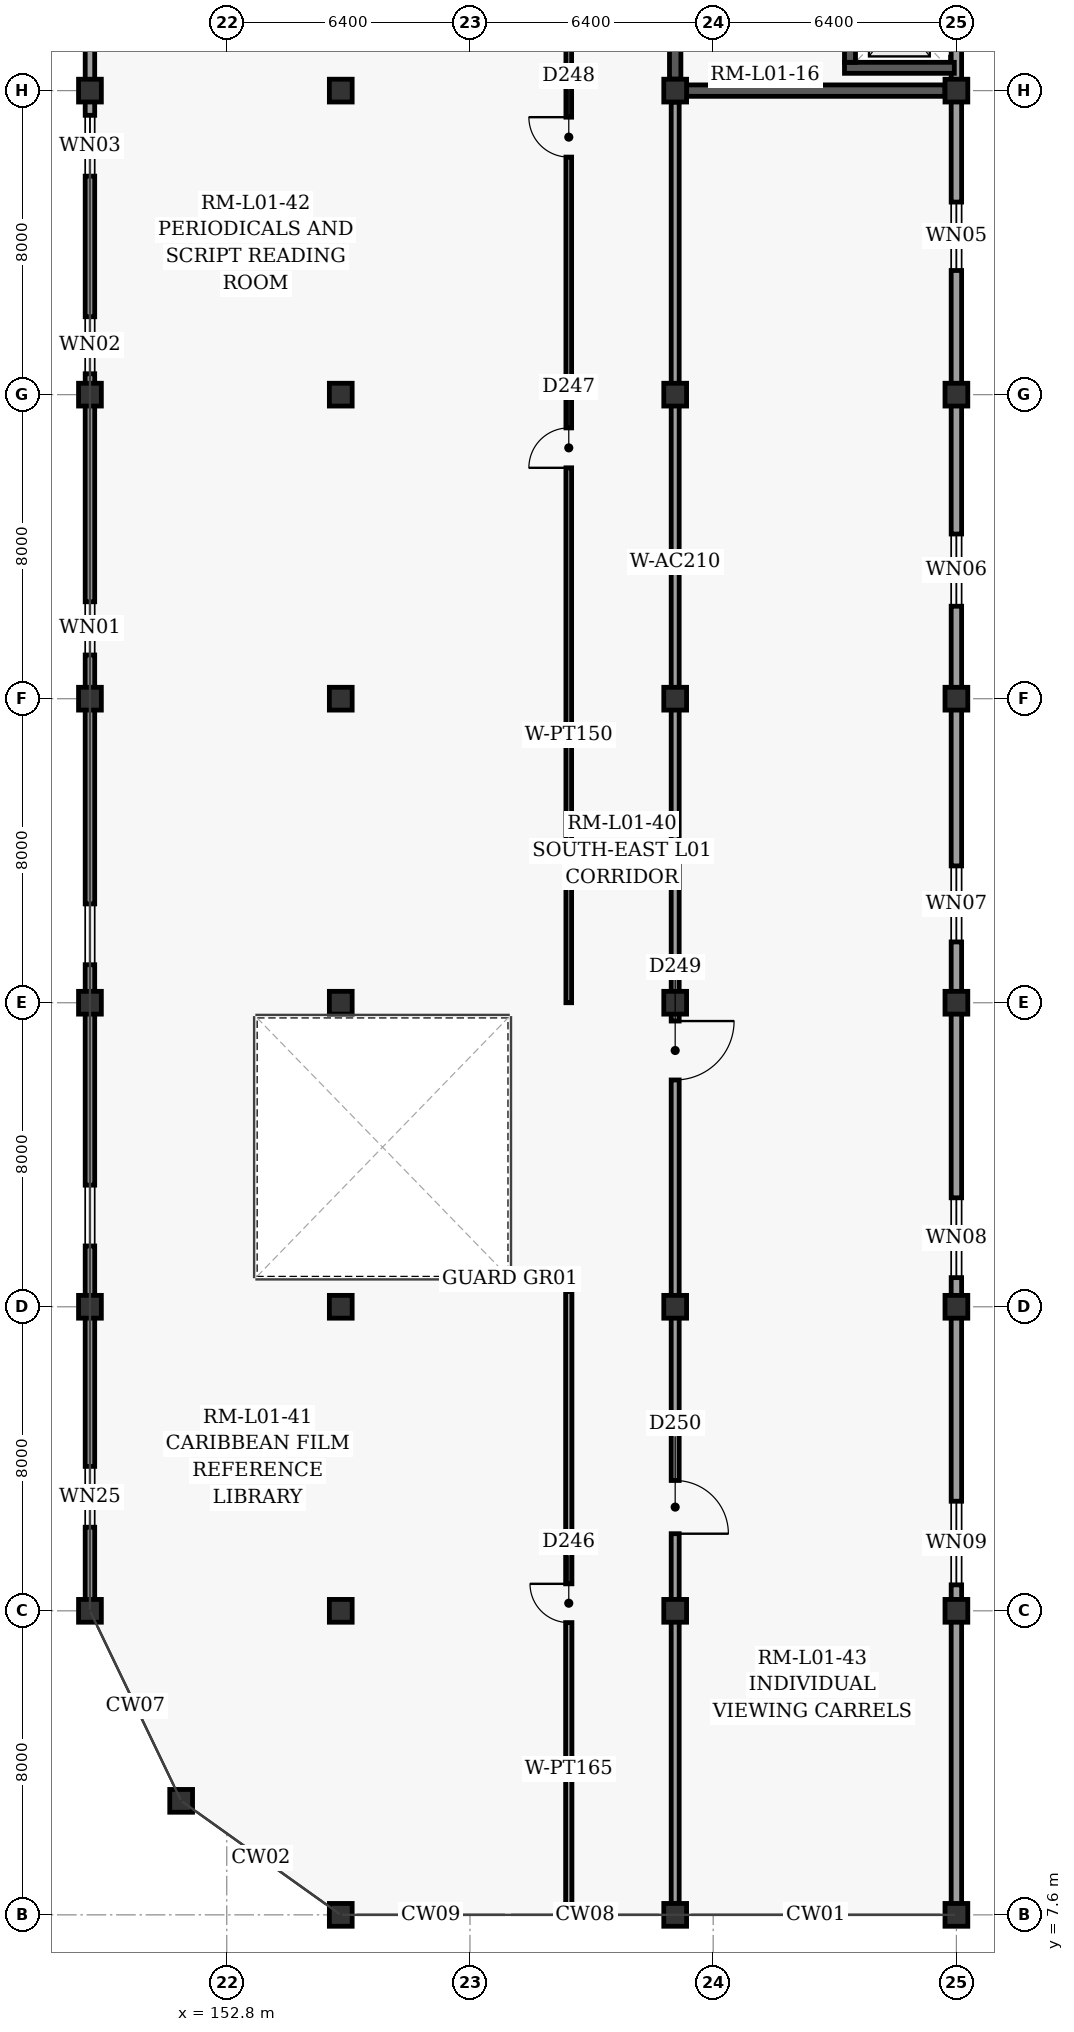
"""IFC4 building model, lengths in metres.
Left out: names, types, materials, properties, quantities, classifications, styles, units other than length and angle.
Written with IfcOpenShell. Run it as: python <this file> out.ifc"""

import sys

from ifc_helpers import new_model, si_unit, direction, frame, frame_2d, origin, origin_2d, place, context, subcontext, project, spatial, rectangle, extrude, element, fill, save


model = new_model("IFC4")
c1 = context("Model", 3, precision=1e-05, world=origin(), true_north=direction((0.0, 1.0)))
c2 = subcontext(c1, "Body", "Model", "MODEL_VIEW")
j1 = project(units=[si_unit("LENGTHUNIT", "METRE"), si_unit("PLANEANGLEUNIT", "RADIAN")], contexts=[c1])
p1 = place(None, origin())
s1 = spatial("IfcSite", under=j1, at=p1, CompositionType="ELEMENT")
p2 = place(p1, origin())
s2 = spatial("IfcBuilding", under=s1, at=p2, CompositionType="ELEMENT")
p3 = place(p2, frame((0.0, 0.0, 5.4)))
s3 = spatial("IfcBuildingStorey", under=s2, at=p3, CompositionType="ELEMENT", Elevation=5.4)
for number, where, z_axis, x_axis in (
    (1, (149.2, 15.6, 0.0), (0.0, 0.0, 1.0), (1.0, 0.0, 0.0)),
    (2, (149.2, 23.6, 0.0), (0.0, 0.0, 1.0), (1.0, 0.0, 0.0)),
    (3, (149.2, 31.6, 0.0), (0.0, 0.0, 1.0), (1.0, 0.0, 0.0)),
    (4, (149.2, 39.6, 0.0), (0.0, 0.0, 1.0), (1.0, 0.0, 0.0)),
    (5, (149.2, 47.6, 0.0), (0.0, 0.0, 1.0), (1.0, 0.0, 0.0)),
    (6, (149.2, 55.6, 0.0), (0.0, 0.0, 1.0), (1.0, 0.0, 0.0)),
    (7, (151.6, 10.6, 0.0), (0.0, 0.0, 1.0), (1.0, 0.0, 0.0)),
    (8, (155.8, 7.6, 0.0), (0.0, 0.0, 1.0), (1.0, 0.0, 0.0)),
    (9, (155.8, 15.6, 0.0), (0.0, 0.0, 1.0), (1.0, 0.0, 0.0)),
    (10, (155.8, 23.6, 0.0), (0.0, 0.0, 1.0), (1.0, 0.0, 0.0)),
    (11, (155.8, 31.6, 0.0), (0.0, 0.0, 1.0), (1.0, 0.0, 0.0)),
    (12, (155.8, 39.6, 0.0), (0.0, 0.0, 1.0), (1.0, 0.0, 0.0)),
    (13, (155.8, 47.6, 0.0), (0.0, 0.0, 1.0), (1.0, 0.0, 0.0)),
    (14, (155.8, 55.6, 0.0), (0.0, 0.0, 1.0), (1.0, 0.0, 0.0)),
    (15, (164.6, 7.6, 0.0), (0.0, 0.0, 1.0), (1.0, 0.0, 0.0)),
    (16, (164.6, 15.6, 0.0), (0.0, 0.0, 1.0), (1.0, 0.0, 0.0)),
    (17, (164.6, 23.6, 0.0), (0.0, 0.0, 1.0), (1.0, 0.0, 0.0)),
    (18, (164.6, 31.6, 0.0), (0.0, 0.0, 1.0), (1.0, 0.0, 0.0)),
    (19, (164.6, 39.6, 0.0), (0.0, 0.0, 1.0), (1.0, 0.0, 0.0)),
    (20, (164.6, 47.6, 0.0), (0.0, 0.0, 1.0), (1.0, 0.0, 0.0)),
    (21, (164.6, 55.6, 0.0), (0.0, 0.0, 1.0), (1.0, 0.0, 0.0)),
    (22, (172.0, 7.6, 0.0), (0.0, 0.0, 1.0), (1.0, 0.0, 0.0)),
    (23, (172.0, 15.6, 0.0), (0.0, 0.0, 1.0), (1.0, 0.0, 0.0)),
    (24, (172.0, 23.6, 0.0), (0.0, 0.0, 1.0), (1.0, 0.0, 0.0)),
    (25, (172.0, 31.6, 0.0), (0.0, 0.0, 1.0), (1.0, 0.0, 0.0)),
    (26, (172.0, 39.6, 0.0), (0.0, 0.0, 1.0), (1.0, 0.0, 0.0)),
    (27, (172.0, 47.6, 0.0), (0.0, 0.0, 1.0), (1.0, 0.0, 0.0)),
    (28, (172.0, 55.6, 0.0), (0.0, 0.0, 1.0), (1.0, 0.0, 0.0)),
):
    element("IfcColumn", number, at=place(p3, frame(where, z_axis=z_axis, x_axis=x_axis)), inside=s3, PredefinedType="COLUMN", context=c2, shape_type="SweptSolid", body=[
        extrude(rectangle(XDim=0.6, YDim=0.6, at=origin_2d()), origin(), (0.0, 0.0, 1.0), 4.8),
    ])
p4 = place(p3, frame((149.2, 15.6, 0.0), z_axis=(0.0, 0.0, 1.0), x_axis=(0.0, 1.0, 0.0)))
e29 = element("IfcWall", 29, at=p4, inside=s3, PredefinedType="SOLIDWALL", context=c2, shape_type="SweptSolid", body=[
    extrude(rectangle(XDim=48.0, YDim=0.25, at=frame_2d((24.0, 0.0))), origin(), (0.0, 0.0, 1.0), 3.67),
])
p5 = place(p4, frame((2.2, 0.0, 0.8)))
e30 = element("IfcOpeningElement", 30, at=p5, cuts=e29, PredefinedType="OPENING", context=c2, shape_type="SweptSolid", body=[
    extrude(rectangle(XDim=1.6, YDim=1.65, at=frame_2d((0.8, 0.825))), frame((0.0, 0.135, 0.0), z_axis=(0.0, -1.0, 0.0), x_axis=(1.0, 0.0, 0.0)), (0.0, 0.0, 1.0), 0.27),
])
p6 = place(p4, frame((9.6, 0.0, 0.8)))
e31 = element("IfcOpeningElement", 31, at=p6, cuts=e29, PredefinedType="OPENING", context=c2, shape_type="SweptSolid", body=[
    extrude(rectangle(XDim=1.6, YDim=1.65, at=frame_2d((0.8, 0.825))), frame((0.0, 0.135, 0.0), z_axis=(0.0, -1.0, 0.0), x_axis=(1.0, 0.0, 0.0)), (0.0, 0.0, 1.0), 0.27),
])
p7 = place(p4, frame((17.0, 0.0, 0.8)))
e32 = element("IfcOpeningElement", 32, at=p7, cuts=e29, PredefinedType="OPENING", context=c2, shape_type="SweptSolid", body=[
    extrude(rectangle(XDim=1.6, YDim=1.65, at=frame_2d((0.8, 0.825))), frame((0.0, 0.135, 0.0), z_axis=(0.0, -1.0, 0.0), x_axis=(1.0, 0.0, 0.0)), (0.0, 0.0, 1.0), 0.27),
])
p8 = place(p4, frame((25.15, 0.0, 0.8)))
e33 = element("IfcOpeningElement", 33, at=p8, cuts=e29, PredefinedType="OPENING", context=c2, shape_type="SweptSolid", body=[
    extrude(rectangle(XDim=1.4, YDim=2.1, at=frame_2d((0.7, 1.05))), frame((0.0, 0.135, 0.0), z_axis=(0.0, -1.0, 0.0), x_axis=(1.0, 0.0, 0.0)), (0.0, 0.0, 1.0), 0.27),
])
p9 = place(p4, frame((32.55, 0.0, 0.8)))
e34 = element("IfcOpeningElement", 34, at=p9, cuts=e29, PredefinedType="OPENING", context=c2, shape_type="SweptSolid", body=[
    extrude(rectangle(XDim=1.5, YDim=2.1, at=frame_2d((0.75, 1.05))), frame((0.0, 0.135, 0.0), z_axis=(0.0, -1.0, 0.0), x_axis=(1.0, 0.0, 0.0)), (0.0, 0.0, 1.0), 0.27),
])
p10 = place(p4, frame((37.75, 0.0, 0.8)))
e35 = element("IfcOpeningElement", 35, at=p10, cuts=e29, PredefinedType="OPENING", context=c2, shape_type="SweptSolid", body=[
    extrude(rectangle(XDim=1.6, YDim=2.1, at=frame_2d((0.8, 1.05))), frame((0.0, 0.135, 0.0), z_axis=(0.0, -1.0, 0.0), x_axis=(1.0, 0.0, 0.0)), (0.0, 0.0, 1.0), 0.27),
])
p11 = place(p3, frame((172.0, 63.6, 0.0), z_axis=(0.0, 0.0, 1.0), x_axis=(0.0, -1.0, 0.0)))
e36 = element("IfcWall", 36, at=p11, inside=s3, PredefinedType="SOLIDWALL", context=c2, shape_type="SweptSolid", body=[
    extrude(rectangle(XDim=56.0, YDim=0.275, at=frame_2d((28.0, 0.0))), origin(), (0.0, 0.0, 1.0), 3.67),
])
p12 = place(p11, frame((10.933, 0.0, 0.8)))
e37 = element("IfcOpeningElement", 37, at=p12, cuts=e36, PredefinedType="OPENING", context=c2, shape_type="SweptSolid", body=[
    extrude(rectangle(XDim=1.8, YDim=2.15, at=frame_2d((0.9, 1.075))), frame((0.0, 0.147, 0.0), z_axis=(0.0, -1.0, 0.0), x_axis=(1.0, 0.0, 0.0)), (0.0, 0.0, 1.0), 0.295),
])
p13 = place(p11, frame((19.667, 0.0, 0.8)))
e38 = element("IfcOpeningElement", 38, at=p13, cuts=e36, PredefinedType="OPENING", context=c2, shape_type="SweptSolid", body=[
    extrude(rectangle(XDim=1.9, YDim=2.2, at=frame_2d((0.95, 1.1))), frame((0.0, 0.147, 0.0), z_axis=(0.0, -1.0, 0.0), x_axis=(1.0, 0.0, 0.0)), (0.0, 0.0, 1.0), 0.295),
])
p14 = place(p11, frame((28.4, 0.0, 0.8)))
e39 = element("IfcOpeningElement", 39, at=p14, cuts=e36, PredefinedType="OPENING", context=c2, shape_type="SweptSolid", body=[
    extrude(rectangle(XDim=2.0, YDim=2.2, at=frame_2d((1.0, 1.1))), frame((0.0, 0.147, 0.0), z_axis=(0.0, -1.0, 0.0), x_axis=(1.0, 0.0, 0.0)), (0.0, 0.0, 1.0), 0.295),
])
p15 = place(p11, frame((37.133, 0.0, 0.8)))
e40 = element("IfcOpeningElement", 40, at=p15, cuts=e36, PredefinedType="OPENING", context=c2, shape_type="SweptSolid", body=[
    extrude(rectangle(XDim=2.1, YDim=2.2, at=frame_2d((1.05, 1.1))), frame((0.0, 0.147, 0.0), z_axis=(0.0, -1.0, 0.0), x_axis=(1.0, 0.0, 0.0)), (0.0, 0.0, 1.0), 0.295),
])
p16 = place(p11, frame((45.117, 0.0, 0.8)))
e41 = element("IfcOpeningElement", 41, at=p16, cuts=e36, PredefinedType="OPENING", context=c2, shape_type="SweptSolid", body=[
    extrude(rectangle(XDim=2.2, YDim=2.25, at=frame_2d((1.1, 1.125))), frame((0.0, 0.147, 0.0), z_axis=(0.0, -1.0, 0.0), x_axis=(1.0, 0.0, 0.0)), (0.0, 0.0, 1.0), 0.295),
])
p17 = place(p3, frame((164.902, 55.6, 0.0), z_axis=(0.0, 0.0, 1.0), x_axis=(1.0, 0.0, 0.0)))
e42 = element("IfcWall", 42, at=p17, inside=s3, PredefinedType="SHEAR", context=c2, shape_type="SweptSolid", body=[
    extrude(rectangle(XDim=6.796, YDim=0.3, at=frame_2d((3.398, 0.0))), origin(), (0.0, 0.0, 1.0), 4.52),
])
p18 = place(p3, frame((164.6, 55.902, 0.0), z_axis=(0.0, 0.0, 1.0), x_axis=(0.0, 1.0, 0.0)))
e43 = element("IfcWall", 43, at=p18, inside=s3, PredefinedType="SHEAR", context=c2, shape_type="SweptSolid", body=[
    extrude(rectangle(XDim=7.396, YDim=0.3, at=frame_2d((3.698, 0.0))), origin(), (0.0, 0.0, 1.0), 4.52),
])
p19 = place(p18, frame((5.348, 0.0, 0.0)))
e44 = element("IfcOpeningElement", 44, at=p19, cuts=e43, PredefinedType="OPENING", context=c2, shape_type="SweptSolid", body=[
    extrude(rectangle(XDim=1.1, YDim=2.15, at=frame_2d((0.55, 1.075))), frame((0.0, 0.16, 0.0), z_axis=(0.0, -1.0, 0.0), x_axis=(1.0, 0.0, 0.0)), (0.0, 0.0, 1.0), 0.32),
])
p20 = place(p18, frame((1.323, 0.0, 0.0)))
e45 = element("IfcOpeningElement", 45, at=p20, cuts=e43, PredefinedType="OPENING", context=c2, shape_type="SweptSolid", body=[
    extrude(rectangle(XDim=1.15, YDim=2.2, at=frame_2d((0.575, 1.1))), frame((0.0, 0.16, 0.0), z_axis=(0.0, -1.0, 0.0), x_axis=(1.0, 0.0, 0.0)), (0.0, 0.0, 1.0), 0.32),
])
p21 = place(p3, frame((169.055, 56.2, 0.0), z_axis=(0.0, 0.0, 1.0), x_axis=(1.0, 0.0, 0.0)))
e46 = element("IfcWall", 46, at=p21, inside=s3, PredefinedType="SHEAR", context=c2, shape_type="SweptSolid", body=[
    extrude(rectangle(XDim=2.89, YDim=0.29, at=frame_2d((1.445, 0.0))), origin(), (0.0, 0.0, 1.0), 4.52),
])
p22 = place(p3, frame((169.2, 56.345, 0.0), z_axis=(0.0, 0.0, 1.0), x_axis=(0.0, 1.0, 0.0)))
e47 = element("IfcWall", 47, at=p22, inside=s3, PredefinedType="SHEAR", context=c2, shape_type="SweptSolid", body=[
    extrude(rectangle(XDim=2.41, YDim=0.29, at=frame_2d((1.205, 0.0))), origin(), (0.0, 0.0, 1.0), 4.52),
])
p23 = place(p22, frame((0.705, 0.0, 0.0)))
e48 = element("IfcOpeningElement", 48, at=p23, cuts=e47, PredefinedType="OPENING", context=c2, shape_type="SweptSolid", body=[
    extrude(rectangle(XDim=1.0, YDim=2.15, at=frame_2d((0.5, 1.075))), frame((0.0, 0.155, 0.0), z_axis=(0.0, -1.0, 0.0), x_axis=(1.0, 0.0, 0.0)), (0.0, 0.0, 1.0), 0.31),
])
p24 = place(p3, frame((161.8, 7.6, 0.0), z_axis=(0.0, 0.0, 1.0), x_axis=(0.0, 1.0, 0.0)))
e49 = element("IfcWall", 49, at=p24, inside=s3, PredefinedType="PARTITIONING", context=c2, shape_type="SweptSolid", body=[
    extrude(rectangle(XDim=16.4, YDim=0.165, at=frame_2d((8.2, 0.0))), origin(), (0.0, 0.0, 1.0), 4.52),
])
p25 = place(p24, frame((7.69, 0.0, 0.0)))
e50 = element("IfcOpeningElement", 50, at=p25, cuts=e49, PredefinedType="OPENING", context=c2, shape_type="SweptSolid", body=[
    extrude(rectangle(XDim=1.02, YDim=2.1, at=frame_2d((0.51, 1.05))), frame((0.0, 0.093, 0.0), z_axis=(0.0, -1.0, 0.0), x_axis=(1.0, 0.0, 0.0)), (0.0, 0.0, 1.0), 0.185),
])
p26 = place(p3, frame((161.8, 31.6, 0.0), z_axis=(0.0, 0.0, 1.0), x_axis=(0.0, 1.0, 0.0)))
e51 = element("IfcWall", 51, at=p26, inside=s3, PredefinedType="PARTITIONING", context=c2, shape_type="SweptSolid", body=[
    extrude(rectangle(XDim=29.2, YDim=0.15, at=frame_2d((14.6, 0.0))), origin(), (0.0, 0.0, 1.0), 4.52),
])
p27 = place(p26, frame((14.075, 0.0, 0.0)))
e52 = element("IfcOpeningElement", 52, at=p27, cuts=e51, PredefinedType="OPENING", context=c2, shape_type="SweptSolid", body=[
    extrude(rectangle(XDim=1.05, YDim=2.15, at=frame_2d((0.525, 1.075))), frame((0.0, 0.085, 0.0), z_axis=(0.0, -1.0, 0.0), x_axis=(1.0, 0.0, 0.0)), (0.0, 0.0, 1.0), 0.17),
])
p28 = place(p26, frame((22.251, 0.0, 0.0)))
e53 = element("IfcOpeningElement", 53, at=p28, cuts=e51, PredefinedType="OPENING", context=c2, shape_type="SweptSolid", body=[
    extrude(rectangle(XDim=1.05, YDim=2.15, at=frame_2d((0.525, 1.075))), frame((0.0, 0.085, 0.0), z_axis=(0.0, -1.0, 0.0), x_axis=(1.0, 0.0, 0.0)), (0.0, 0.0, 1.0), 0.17),
])
p29 = place(p3, frame((164.6, 55.298, 0.0), z_axis=(0.0, 0.0, 1.0), x_axis=(0.0, -1.0, 0.0)))
e54 = element("IfcWall", 54, at=p29, inside=s3, PredefinedType="PARTITIONING", context=c2, shape_type="SweptSolid", body=[
    extrude(rectangle(XDim=47.396, YDim=0.21, at=frame_2d((23.698, 0.0))), origin(), (0.0, 0.0, 1.0), 3.67),
])
p30 = place(p29, frame((24.18, 0.0, 0.0)))
e55 = element("IfcOpeningElement", 55, at=p30, cuts=e54, PredefinedType="OPENING", context=c2, shape_type="SweptSolid", body=[
    extrude(rectangle(XDim=1.55, YDim=2.25, at=frame_2d((0.775, 1.125))), frame((0.0, 0.115, 0.0), z_axis=(0.0, -1.0, 0.0), x_axis=(1.0, 0.0, 0.0)), (0.0, 0.0, 1.0), 0.23),
])
p31 = place(p29, frame((36.269, 0.0, 0.0)))
e56 = element("IfcOpeningElement", 56, at=p31, cuts=e54, PredefinedType="OPENING", context=c2, shape_type="SweptSolid", body=[
    extrude(rectangle(XDim=1.4, YDim=2.25, at=frame_2d((0.7, 1.125))), frame((0.0, 0.115, 0.0), z_axis=(0.0, -1.0, 0.0), x_axis=(1.0, 0.0, 0.0)), (0.0, 0.0, 1.0), 0.23),
])
p32 = place(p5, origin())
e57 = element("IfcWindow", 57, at=p32, inside=s3, PartitioningType="SINGLE_PANEL", PredefinedType="WINDOW", context=c2, shape_type="SweptSolid", body=[
    extrude(rectangle(XDim=1.6, YDim=1.65, at=frame_2d((0.8, 0.825))), frame((0.0, 0.03, 0.0), z_axis=(0.0, -1.0, 0.0), x_axis=(1.0, 0.0, 0.0)), (0.0, 0.0, 1.0), 0.06),
])
fill(e30, e57)
p33 = place(p6, origin())
e58 = element("IfcWindow", 58, at=p33, inside=s3, PartitioningType="SINGLE_PANEL", PredefinedType="WINDOW", context=c2, shape_type="SweptSolid", body=[
    extrude(rectangle(XDim=1.6, YDim=1.65, at=frame_2d((0.8, 0.825))), frame((0.0, 0.03, 0.0), z_axis=(0.0, -1.0, 0.0), x_axis=(1.0, 0.0, 0.0)), (0.0, 0.0, 1.0), 0.06),
])
fill(e31, e58)
p34 = place(p7, origin())
e59 = element("IfcWindow", 59, at=p34, inside=s3, PartitioningType="SINGLE_PANEL", PredefinedType="WINDOW", context=c2, shape_type="SweptSolid", body=[
    extrude(rectangle(XDim=1.6, YDim=1.65, at=frame_2d((0.8, 0.825))), frame((0.0, 0.03, 0.0), z_axis=(0.0, -1.0, 0.0), x_axis=(1.0, 0.0, 0.0)), (0.0, 0.0, 1.0), 0.06),
])
fill(e32, e59)
p35 = place(p8, origin())
e60 = element("IfcWindow", 60, at=p35, inside=s3, PartitioningType="SINGLE_PANEL", PredefinedType="WINDOW", context=c2, shape_type="SweptSolid", body=[
    extrude(rectangle(XDim=1.4, YDim=2.1, at=frame_2d((0.7, 1.05))), frame((0.0, 0.03, 0.0), z_axis=(0.0, -1.0, 0.0), x_axis=(1.0, 0.0, 0.0)), (0.0, 0.0, 1.0), 0.06),
])
fill(e33, e60)
p36 = place(p9, origin())
e61 = element("IfcWindow", 61, at=p36, inside=s3, PartitioningType="SINGLE_PANEL", PredefinedType="WINDOW", context=c2, shape_type="SweptSolid", body=[
    extrude(rectangle(XDim=1.5, YDim=2.1, at=frame_2d((0.75, 1.05))), frame((0.0, 0.03, 0.0), z_axis=(0.0, -1.0, 0.0), x_axis=(1.0, 0.0, 0.0)), (0.0, 0.0, 1.0), 0.06),
])
fill(e34, e61)
p37 = place(p10, origin())
e62 = element("IfcWindow", 62, at=p37, inside=s3, PartitioningType="SINGLE_PANEL", PredefinedType="WINDOW", context=c2, shape_type="SweptSolid", body=[
    extrude(rectangle(XDim=1.6, YDim=2.1, at=frame_2d((0.8, 1.05))), frame((0.0, 0.03, 0.0), z_axis=(0.0, -1.0, 0.0), x_axis=(1.0, 0.0, 0.0)), (0.0, 0.0, 1.0), 0.06),
])
fill(e35, e62)
p38 = place(p12, origin())
e63 = element("IfcWindow", 63, at=p38, inside=s3, PartitioningType="SINGLE_PANEL", PredefinedType="WINDOW", context=c2, shape_type="SweptSolid", body=[
    extrude(rectangle(XDim=1.8, YDim=2.15, at=frame_2d((0.9, 1.075))), frame((0.0, 0.03, 0.0), z_axis=(0.0, -1.0, 0.0), x_axis=(1.0, 0.0, 0.0)), (0.0, 0.0, 1.0), 0.06),
])
fill(e37, e63)
p39 = place(p13, origin())
e64 = element("IfcWindow", 64, at=p39, inside=s3, PartitioningType="SINGLE_PANEL", PredefinedType="WINDOW", context=c2, shape_type="SweptSolid", body=[
    extrude(rectangle(XDim=1.9, YDim=2.2, at=frame_2d((0.95, 1.1))), frame((0.0, 0.03, 0.0), z_axis=(0.0, -1.0, 0.0), x_axis=(1.0, 0.0, 0.0)), (0.0, 0.0, 1.0), 0.06),
])
fill(e38, e64)
p40 = place(p14, origin())
e65 = element("IfcWindow", 65, at=p40, inside=s3, PartitioningType="SINGLE_PANEL", PredefinedType="WINDOW", context=c2, shape_type="SweptSolid", body=[
    extrude(rectangle(XDim=2.0, YDim=2.2, at=frame_2d((1.0, 1.1))), frame((0.0, 0.03, 0.0), z_axis=(0.0, -1.0, 0.0), x_axis=(1.0, 0.0, 0.0)), (0.0, 0.0, 1.0), 0.06),
])
fill(e39, e65)
p41 = place(p15, origin())
e66 = element("IfcWindow", 66, at=p41, inside=s3, PartitioningType="SINGLE_PANEL", PredefinedType="WINDOW", context=c2, shape_type="SweptSolid", body=[
    extrude(rectangle(XDim=2.1, YDim=2.2, at=frame_2d((1.05, 1.1))), frame((0.0, 0.03, 0.0), z_axis=(0.0, -1.0, 0.0), x_axis=(1.0, 0.0, 0.0)), (0.0, 0.0, 1.0), 0.06),
])
fill(e40, e66)
p42 = place(p16, origin())
e67 = element("IfcWindow", 67, at=p42, inside=s3, PartitioningType="SINGLE_PANEL", PredefinedType="WINDOW", context=c2, shape_type="SweptSolid", body=[
    extrude(rectangle(XDim=2.2, YDim=2.25, at=frame_2d((1.1, 1.125))), frame((0.0, 0.03, 0.0), z_axis=(0.0, -1.0, 0.0), x_axis=(1.0, 0.0, 0.0)), (0.0, 0.0, 1.0), 0.06),
])
fill(e41, e67)
p43 = place(p25, origin())
e68 = element("IfcDoor", 68, at=p43, inside=s3, OperationType="SINGLE_SWING_RIGHT", PredefinedType="DOOR", context=c2, shape_type="SweptSolid", body=[
    extrude(rectangle(XDim=1.02, YDim=2.1, at=frame_2d((0.51, 1.05))), frame((0.0, 0.025, 0.0), z_axis=(0.0, -1.0, 0.0), x_axis=(1.0, 0.0, 0.0)), (0.0, 0.0, 1.0), 0.05),
])
fill(e50, e68)
p44 = place(p27, origin())
e69 = element("IfcDoor", 69, at=p44, inside=s3, OperationType="SINGLE_SWING_LEFT", PredefinedType="DOOR", context=c2, shape_type="SweptSolid", body=[
    extrude(rectangle(XDim=1.05, YDim=2.15, at=frame_2d((0.525, 1.075))), frame((0.0, 0.025, 0.0), z_axis=(0.0, -1.0, 0.0), x_axis=(1.0, 0.0, 0.0)), (0.0, 0.0, 1.0), 0.05),
])
fill(e52, e69)
p45 = place(p28, origin())
e70 = element("IfcDoor", 70, at=p45, inside=s3, OperationType="SINGLE_SWING_RIGHT", PredefinedType="DOOR", context=c2, shape_type="SweptSolid", body=[
    extrude(rectangle(XDim=1.05, YDim=2.15, at=frame_2d((0.525, 1.075))), frame((0.0, 0.025, 0.0), z_axis=(0.0, -1.0, 0.0), x_axis=(1.0, 0.0, 0.0)), (0.0, 0.0, 1.0), 0.05),
])
fill(e53, e70)
p46 = place(p30, origin())
e71 = element("IfcDoor", 71, at=p46, inside=s3, OperationType="SINGLE_SWING_LEFT", PredefinedType="DOOR", context=c2, shape_type="SweptSolid", body=[
    extrude(rectangle(XDim=1.55, YDim=2.25, at=frame_2d((0.775, 1.125))), frame((0.0, 0.025, 0.0), z_axis=(0.0, -1.0, 0.0), x_axis=(1.0, 0.0, 0.0)), (0.0, 0.0, 1.0), 0.05),
])
fill(e55, e71)
p47 = place(p31, origin())
e72 = element("IfcDoor", 72, at=p47, inside=s3, OperationType="SINGLE_SWING_RIGHT", PredefinedType="DOOR", context=c2, shape_type="SweptSolid", body=[
    extrude(rectangle(XDim=1.4, YDim=2.25, at=frame_2d((0.7, 1.125))), frame((0.0, 0.025, 0.0), z_axis=(0.0, -1.0, 0.0), x_axis=(1.0, 0.0, 0.0)), (0.0, 0.0, 1.0), 0.05),
])
fill(e56, e72)
save(model, sys.argv[1])
